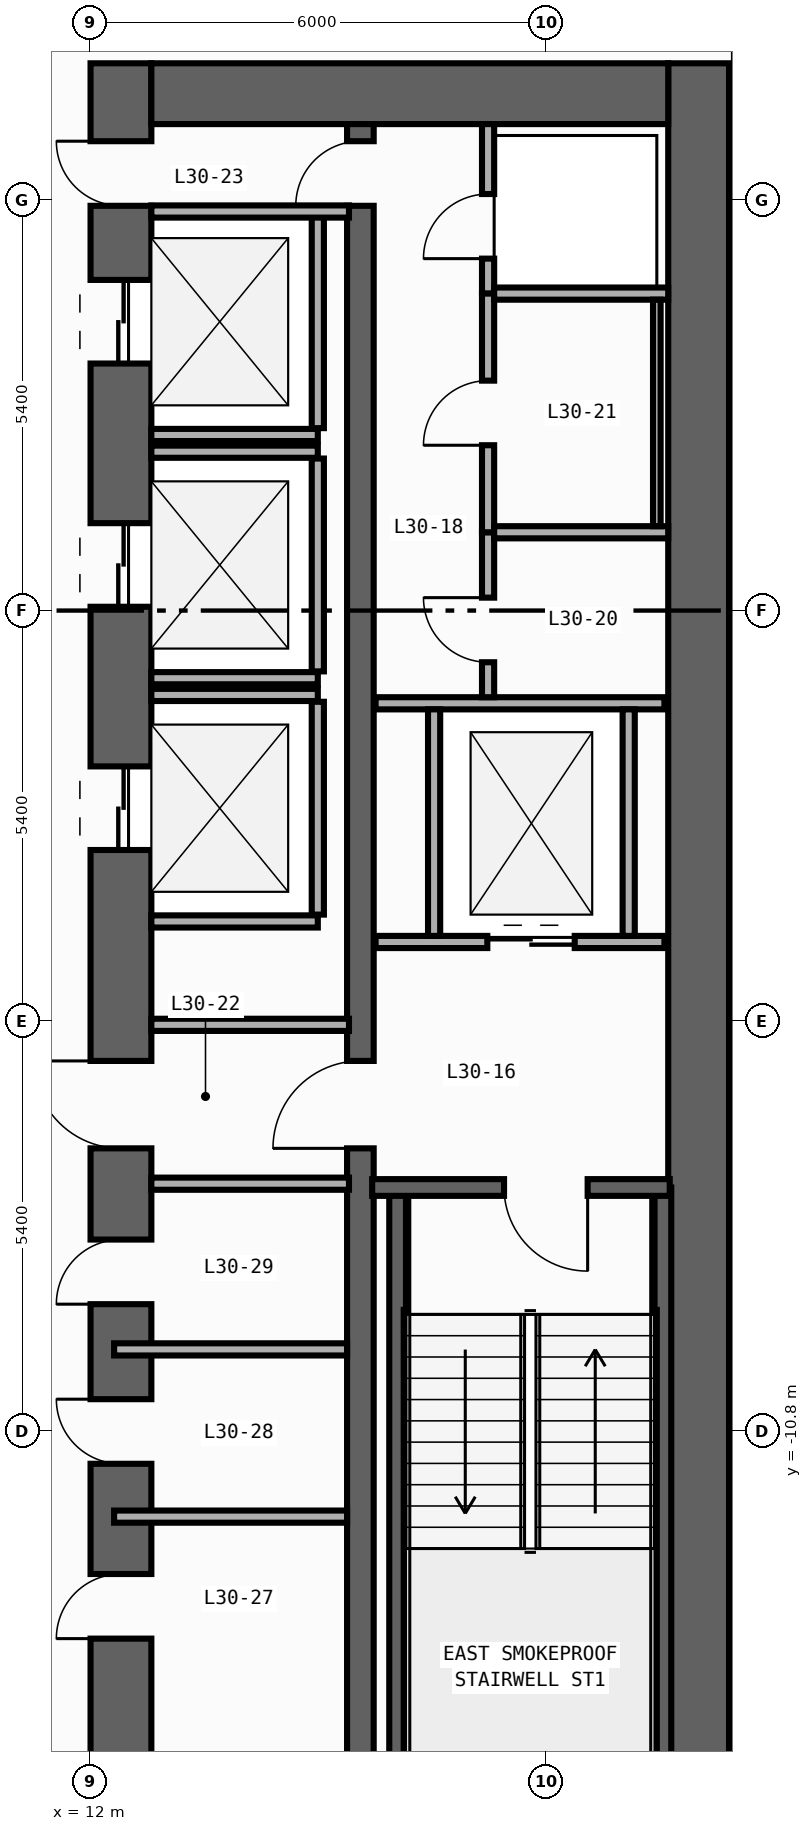
"""IFC4 building model, lengths in metres.
Left out: names, types, materials, properties, quantities, classifications, styles, units other than length and angle.
Written with IfcOpenShell. Run it as: python <this file> out.ifc"""

import sys

from ifc_helpers import new_model, si_unit, direction, frame, frame_2d, origin, place, context, subcontext, project, spatial, rectangle, extrude, element, fill, save


model = new_model("IFC4")
c1 = context("Model", 3, precision=1e-05, world=origin(), true_north=direction((0.0, 1.0)))
c2 = subcontext(c1, "Body", "Model", "MODEL_VIEW")
j1 = project(units=[si_unit("LENGTHUNIT", "METRE"), si_unit("PLANEANGLEUNIT", "RADIAN")], contexts=[c1])
p1 = place(None, origin())
s1 = spatial("IfcSite", under=j1, at=p1, CompositionType="ELEMENT")
p2 = place(p1, origin())
s2 = spatial("IfcBuilding", under=s1, at=p2, CompositionType="ELEMENT")
p3 = place(p2, frame((0.0, 0.0, 131.0)))
s3 = spatial("IfcBuildingStorey", under=s2, at=p3, CompositionType="ELEMENT", Elevation=131.0)
p4 = place(p3, frame((12.4, -19.8, 0.0), z_axis=(0.0, 0.0, 1.0), x_axis=(0.0, 1.0, 0.0)))
e1 = element("IfcWall", 1, at=p4, inside=s3, PredefinedType="SHEAR", context=c2, shape_type="SweptSolid", body=[
    extrude(rectangle(XDim=27.0, YDim=0.8, at=frame_2d((13.5, 0.0))), origin(), (0.0, 0.0, 1.0), 3.94),
])
p5 = place(p4, frame((23.05, 0.0, 0.0)))
e2 = element("IfcOpeningElement", 2, at=p5, cuts=e1, PredefinedType="OPENING", context=c2, shape_type="SweptSolid", body=[
    extrude(rectangle(XDim=1.1, YDim=2.2, at=frame_2d((0.55, 1.1))), frame((0.0, 0.41, 0.0), z_axis=(0.0, -1.0, 0.0), x_axis=(1.0, 0.0, 0.0)), (0.0, 0.0, 1.0), 0.82),
])
p6 = place(p4, frame((19.85, 0.0, 0.0)))
e3 = element("IfcOpeningElement", 3, at=p6, cuts=e1, PredefinedType="OPENING", context=c2, shape_type="SweptSolid", body=[
    extrude(rectangle(XDim=1.1, YDim=2.2, at=frame_2d((0.55, 1.1))), frame((0.0, 0.41, 0.0), z_axis=(0.0, -1.0, 0.0), x_axis=(1.0, 0.0, 0.0)), (0.0, 0.0, 1.0), 0.82),
])
p7 = place(p4, frame((16.65, 0.0, 0.0)))
e4 = element("IfcOpeningElement", 4, at=p7, cuts=e1, PredefinedType="OPENING", context=c2, shape_type="SweptSolid", body=[
    extrude(rectangle(XDim=1.1, YDim=2.2, at=frame_2d((0.55, 1.1))), frame((0.0, 0.41, 0.0), z_axis=(0.0, -1.0, 0.0), x_axis=(1.0, 0.0, 0.0)), (0.0, 0.0, 1.0), 0.82),
])
p8 = place(p4, frame((6.275, 0.0, 0.0)))
e5 = element("IfcOpeningElement", 5, at=p8, cuts=e1, PredefinedType="OPENING", context=c2, shape_type="SweptSolid", body=[
    extrude(rectangle(XDim=0.85, YDim=2.1, at=frame_2d((0.425, 1.05))), frame((0.0, 0.41, 0.0), z_axis=(0.0, -1.0, 0.0), x_axis=(1.0, 0.0, 0.0)), (0.0, 0.0, 1.0), 0.82),
])
p9 = place(p4, frame((8.575, 0.0, 0.0)))
e6 = element("IfcOpeningElement", 6, at=p9, cuts=e1, PredefinedType="OPENING", context=c2, shape_type="SweptSolid", body=[
    extrude(rectangle(XDim=0.85, YDim=2.1, at=frame_2d((0.425, 1.05))), frame((0.0, 0.41, 0.0), z_axis=(0.0, -1.0, 0.0), x_axis=(1.0, 0.0, 0.0)), (0.0, 0.0, 1.0), 0.82),
])
p10 = place(p4, frame((10.675, 0.0, 0.0)))
e7 = element("IfcOpeningElement", 7, at=p10, cuts=e1, PredefinedType="OPENING", context=c2, shape_type="SweptSolid", body=[
    extrude(rectangle(XDim=0.85, YDim=2.1, at=frame_2d((0.425, 1.05))), frame((0.0, 0.41, 0.0), z_axis=(0.0, -1.0, 0.0), x_axis=(1.0, 0.0, 0.0)), (0.0, 0.0, 1.0), 0.82),
])
p11 = place(p4, frame((12.725, 0.0, 0.0)))
e8 = element("IfcOpeningElement", 8, at=p11, cuts=e1, PredefinedType="OPENING", context=c2, shape_type="SweptSolid", body=[
    extrude(rectangle(XDim=1.15, YDim=2.2, at=frame_2d((0.575, 1.1))), frame((0.0, 0.41, 0.0), z_axis=(0.0, -1.0, 0.0), x_axis=(1.0, 0.0, 0.0)), (0.0, 0.0, 1.0), 0.82),
])
p12 = place(p4, frame((25.125, 0.0, 0.0)))
e9 = element("IfcOpeningElement", 9, at=p12, cuts=e1, PredefinedType="OPENING", context=c2, shape_type="SweptSolid", body=[
    extrude(rectangle(XDim=0.85, YDim=2.1, at=frame_2d((0.425, 1.05))), frame((0.0, 0.41, 0.0), z_axis=(0.0, -1.0, 0.0), x_axis=(1.0, 0.0, 0.0)), (0.0, 0.0, 1.0), 0.82),
])
p13 = place(p3, frame((20.0, -19.8, 0.0), z_axis=(0.0, 0.0, 1.0), x_axis=(0.0, 1.0, 0.0)))
e10 = element("IfcWall", 10, at=p13, inside=s3, PredefinedType="SHEAR", context=c2, shape_type="SweptSolid", body=[
    extrude(rectangle(XDim=27.0, YDim=0.8, at=frame_2d((13.5, 0.0))), origin(), (0.0, 0.0, 1.0), 3.94),
])
p14 = place(p3, frame((12.8, 6.8, 0.0), z_axis=(0.0, 0.0, 1.0), x_axis=(1.0, 0.0, 0.0)))
e11 = element("IfcWall", 11, at=p14, inside=s3, PredefinedType="SHEAR", context=c2, shape_type="SweptSolid", body=[
    extrude(rectangle(XDim=6.8, YDim=0.8, at=frame_2d((3.4, 0.0))), origin(), (0.0, 0.0, 1.0), 3.94),
])
p15 = place(p3, frame((15.55, -19.0, 0.0), z_axis=(0.0, 0.0, 1.0), x_axis=(0.0, 1.0, 0.0)))
e12 = element("IfcWall", 12, at=p15, inside=s3, PredefinedType="SHEAR", context=c2, shape_type="SweptSolid", body=[
    extrude(rectangle(XDim=25.4, YDim=0.35, at=frame_2d((12.7, 0.0))), origin(), (0.0, 0.0, 1.0), 3.94),
])
p16 = place(p15, frame((11.925, 0.0, 0.0)))
e13 = element("IfcOpeningElement", 13, at=p16, cuts=e12, PredefinedType="OPENING", context=c2, shape_type="SweptSolid", body=[
    extrude(rectangle(XDim=1.15, YDim=2.2, at=frame_2d((0.575, 1.1))), frame((0.0, 0.185, 0.0), z_axis=(0.0, -1.0, 0.0), x_axis=(1.0, 0.0, 0.0)), (0.0, 0.0, 1.0), 0.37),
])
p17 = place(p15, frame((24.325, 0.0, 0.0)))
e14 = element("IfcOpeningElement", 14, at=p17, cuts=e12, PredefinedType="OPENING", context=c2, shape_type="SweptSolid", body=[
    extrude(rectangle(XDim=0.85, YDim=2.1, at=frame_2d((0.425, 1.05))), frame((0.0, 0.185, 0.0), z_axis=(0.0, -1.0, 0.0), x_axis=(1.0, 0.0, 0.0)), (0.0, 0.0, 1.0), 0.37),
])
for number, where, z_axis, x_axis in (
    (15, (16.04, -18.89, 0.0), (0.0, 0.0, 1.0), (0.0, 1.0, 0.0)),
    (16, (19.53, -18.89, 0.0), (0.0, 0.0, 1.0), (0.0, 1.0, 0.0)),
):
    element("IfcWall", number, at=place(p3, frame(where, z_axis=z_axis, x_axis=x_axis)), inside=s3, PredefinedType="SHEAR", context=c2, shape_type="SweptSolid", body=[
        extrude(rectangle(XDim=11.3, YDim=0.22, at=frame_2d((5.65, 0.0))), origin(), (0.0, 0.0, 1.0), 3.94),
    ])
p18 = place(p3, frame((19.62, -7.59, 0.0), z_axis=(0.0, 0.0, 1.0), x_axis=(-1.0, 0.0, 0.0)))
e17 = element("IfcWall", 17, at=p18, inside=s3, PredefinedType="SHEAR", context=c2, shape_type="SweptSolid", body=[
    extrude(rectangle(XDim=3.915, YDim=0.22, at=frame_2d((1.958, 0.0))), origin(), (0.0, 0.0, 1.0), 3.94),
])
p19 = place(p18, frame((1.08, 0.0, 0.0)))
e18 = element("IfcOpeningElement", 18, at=p19, cuts=e17, PredefinedType="OPENING", context=c2, shape_type="SweptSolid", body=[
    extrude(rectangle(XDim=1.1, YDim=2.2, at=frame_2d((0.55, 1.1))), frame((0.0, 0.12, 0.0), z_axis=(0.0, -1.0, 0.0), x_axis=(1.0, 0.0, 0.0)), (0.0, 0.0, 1.0), 0.24),
])
p20 = place(p3, frame((12.8, 2.31, 0.0), z_axis=(0.0, 0.0, 1.0), x_axis=(1.0, 0.0, 0.0)))
e19 = element("IfcWall", 19, at=p20, inside=s3, PredefinedType="STANDARD", context=c2, shape_type="SweptSolid", body=[
    extrude(rectangle(XDim=2.19, YDim=0.16, at=frame_2d((1.095, 0.0))), origin(), (0.0, 0.0, 1.0), 3.94),
])
p21 = place(p3, frame((14.99, 2.4, 0.0), z_axis=(0.0, 0.0, 1.0), x_axis=(0.0, 1.0, 0.0)))
e20 = element("IfcWall", 20, at=p21, inside=s3, PredefinedType="STANDARD", context=c2, shape_type="SweptSolid", body=[
    extrude(rectangle(XDim=2.8, YDim=0.16, at=frame_2d((1.4, 0.0))), origin(), (0.0, 0.0, 1.0), 3.94),
])
for number, where, z_axis, x_axis in (
    (21, (12.8, -0.89, 0.0), (0.0, 0.0, 1.0), (1.0, 0.0, 0.0)),
    (22, (12.8, 2.09, 0.0), (0.0, 0.0, 1.0), (1.0, 0.0, 0.0)),
):
    element("IfcWall", number, at=place(p3, frame(where, z_axis=z_axis, x_axis=x_axis)), inside=s3, PredefinedType="STANDARD", context=c2, shape_type="SweptSolid", body=[
        extrude(rectangle(XDim=2.19, YDim=0.16, at=frame_2d((1.095, 0.0))), origin(), (0.0, 0.0, 1.0), 3.94),
    ])
p22 = place(p3, frame((14.99, -0.8, 0.0), z_axis=(0.0, 0.0, 1.0), x_axis=(0.0, 1.0, 0.0)))
e23 = element("IfcWall", 23, at=p22, inside=s3, PredefinedType="STANDARD", context=c2, shape_type="SweptSolid", body=[
    extrude(rectangle(XDim=2.8, YDim=0.16, at=frame_2d((1.4, 0.0))), origin(), (0.0, 0.0, 1.0), 3.94),
])
for number, where, z_axis, x_axis in (
    (24, (12.8, -4.09, 0.0), (0.0, 0.0, 1.0), (1.0, 0.0, 0.0)),
    (25, (12.8, -1.11, 0.0), (0.0, 0.0, 1.0), (1.0, 0.0, 0.0)),
):
    element("IfcWall", number, at=place(p3, frame(where, z_axis=z_axis, x_axis=x_axis)), inside=s3, PredefinedType="STANDARD", context=c2, shape_type="SweptSolid", body=[
        extrude(rectangle(XDim=2.19, YDim=0.16, at=frame_2d((1.095, 0.0))), origin(), (0.0, 0.0, 1.0), 3.94),
    ])
p23 = place(p3, frame((14.99, -4.0, 0.0), z_axis=(0.0, 0.0, 1.0), x_axis=(0.0, 1.0, 0.0)))
e26 = element("IfcWall", 26, at=p23, inside=s3, PredefinedType="STANDARD", context=c2, shape_type="SweptSolid", body=[
    extrude(rectangle(XDim=2.8, YDim=0.16, at=frame_2d((1.4, 0.0))), origin(), (0.0, 0.0, 1.0), 3.94),
])
p24 = place(p3, frame((15.75, -4.36, 0.0), z_axis=(0.0, 0.0, 1.0), x_axis=(1.0, 0.0, 0.0)))
e27 = element("IfcWall", 27, at=p24, inside=s3, PredefinedType="STANDARD", context=c2, shape_type="SweptSolid", body=[
    extrude(rectangle(XDim=3.8, YDim=0.16, at=frame_2d((1.9, 0.0))), origin(), (0.0, 0.0, 1.0), 3.94),
])
p25 = place(p24, frame((1.47, 0.0, 0.0)))
e28 = element("IfcOpeningElement", 28, at=p25, cuts=e27, PredefinedType="OPENING", context=c2, shape_type="SweptSolid", body=[
    extrude(rectangle(XDim=1.15, YDim=2.2, at=frame_2d((0.575, 1.1))), frame((0.0, 0.09, 0.0), z_axis=(0.0, -1.0, 0.0), x_axis=(1.0, 0.0, 0.0)), (0.0, 0.0, 1.0), 0.18),
])
p26 = place(p3, frame((15.75, -1.22, 0.0), z_axis=(0.0, 0.0, 1.0), x_axis=(1.0, 0.0, 0.0)))
e29 = element("IfcWall", 29, at=p26, inside=s3, PredefinedType="STANDARD", context=c2, shape_type="SweptSolid", body=[
    extrude(rectangle(XDim=3.8, YDim=0.16, at=frame_2d((1.9, 0.0))), origin(), (0.0, 0.0, 1.0), 3.94),
])
for number, where, z_axis, x_axis in (
    (30, (16.52, -4.28, 0.0), (0.0, 0.0, 1.0), (0.0, 1.0, 0.0)),
    (31, (19.08, -4.28, 0.0), (0.0, 0.0, 1.0), (0.0, 1.0, 0.0)),
):
    element("IfcWall", number, at=place(p3, frame(where, z_axis=z_axis, x_axis=x_axis)), inside=s3, PredefinedType="STANDARD", context=c2, shape_type="SweptSolid", body=[
        extrude(rectangle(XDim=2.98, YDim=0.16, at=frame_2d((1.49, 0.0))), origin(), (0.0, 0.0, 1.0), 3.94),
    ])
for number, where, z_axis, x_axis in (
    (32, (12.8, -5.45, 0.0), (0.0, 0.0, 1.0), (1.0, 0.0, 0.0)),
    (33, (12.8, -7.54, 0.0), (0.0, 0.0, 1.0), (1.0, 0.0, 0.0)),
    (34, (12.8, 5.25, 0.0), (0.0, 0.0, 1.0), (1.0, 0.0, 0.0)),
):
    element("IfcWall", number, at=place(p3, frame(where, z_axis=z_axis, x_axis=x_axis)), inside=s3, PredefinedType="STANDARD", context=c2, shape_type="SweptSolid", body=[
        extrude(rectangle(XDim=2.6, YDim=0.16, at=frame_2d((1.3, 0.0))), origin(), (0.0, 0.0, 1.0), 3.94),
    ])
p27 = place(p3, frame((17.23, 4.17, 0.0), z_axis=(0.0, 0.0, 1.0), x_axis=(0.0, 1.0, 0.0)))
e35 = element("IfcWall", 35, at=p27, inside=s3, PredefinedType="PARTITIONING", context=c2, shape_type="SweptSolid", body=[
    extrude(rectangle(XDim=2.23, YDim=0.16, at=frame_2d((1.115, 0.0))), origin(), (0.0, 0.0, 1.0), 3.94),
])
p28 = place(p27, frame((0.46, 0.0, 0.0)))
e36 = element("IfcOpeningElement", 36, at=p28, cuts=e35, PredefinedType="OPENING", context=c2, shape_type="SweptSolid", body=[
    extrude(rectangle(XDim=0.85, YDim=2.1, at=frame_2d((0.425, 1.05))), frame((0.0, 0.09, 0.0), z_axis=(0.0, -1.0, 0.0), x_axis=(1.0, 0.0, 0.0)), (0.0, 0.0, 1.0), 0.18),
])
p29 = place(p3, frame((17.23, -1.14, 0.0), z_axis=(0.0, 0.0, 1.0), x_axis=(0.0, 1.0, 0.0)))
e37 = element("IfcWall", 37, at=p29, inside=s3, PredefinedType="PARTITIONING", context=c2, shape_type="SweptSolid", body=[
    extrude(rectangle(XDim=2.17, YDim=0.16, at=frame_2d((1.085, 0.0))), origin(), (0.0, 0.0, 1.0), 3.94),
])
p30 = place(p29, frame((0.46, 0.0, 0.0)))
e38 = element("IfcOpeningElement", 38, at=p30, cuts=e37, PredefinedType="OPENING", context=c2, shape_type="SweptSolid", body=[
    extrude(rectangle(XDim=0.85, YDim=2.1, at=frame_2d((0.425, 1.05))), frame((0.0, 0.09, 0.0), z_axis=(0.0, -1.0, 0.0), x_axis=(1.0, 0.0, 0.0)), (0.0, 0.0, 1.0), 0.18),
])
p31 = place(p3, frame((17.23, 1.03, 0.0), z_axis=(0.0, 0.0, 1.0), x_axis=(0.0, 1.0, 0.0)))
e39 = element("IfcWall", 39, at=p31, inside=s3, PredefinedType="PARTITIONING", context=c2, shape_type="SweptSolid", body=[
    extrude(rectangle(XDim=3.14, YDim=0.16, at=frame_2d((1.57, 0.0))), origin(), (0.0, 0.0, 1.0), 3.94),
])
p32 = place(p31, frame((1.145, 0.0, 0.0)))
e40 = element("IfcOpeningElement", 40, at=p32, cuts=e39, PredefinedType="OPENING", context=c2, shape_type="SweptSolid", body=[
    extrude(rectangle(XDim=0.85, YDim=2.1, at=frame_2d((0.425, 1.05))), frame((0.0, 0.09, 0.0), z_axis=(0.0, -1.0, 0.0), x_axis=(1.0, 0.0, 0.0)), (0.0, 0.0, 1.0), 0.18),
])
for number, where, z_axis, x_axis in (
    (41, (17.31, 4.17, 0.0), (0.0, 0.0, 1.0), (1.0, 0.0, 0.0)),
    (42, (17.31, 1.03, 0.0), (0.0, 0.0, 1.0), (1.0, 0.0, 0.0)),
):
    element("IfcWall", number, at=place(p3, frame(where, z_axis=z_axis, x_axis=x_axis)), inside=s3, PredefinedType="PARTITIONING", context=c2, shape_type="SweptSolid", body=[
        extrude(rectangle(XDim=2.29, YDim=0.16, at=frame_2d((1.145, 0.0))), origin(), (0.0, 0.0, 1.0), 3.94),
    ])
for number, where, z_axis, x_axis in (
    (43, (12.31, -11.92, 0.0), (0.0, 0.0, 1.0), (1.0, 0.0, 0.0)),
    (44, (12.31, -9.72, 0.0), (0.0, 0.0, 1.0), (1.0, 0.0, 0.0)),
):
    element("IfcWall", number, at=place(p3, frame(where, z_axis=z_axis, x_axis=x_axis)), inside=s3, PredefinedType="PARTITIONING", context=c2, shape_type="SweptSolid", body=[
        extrude(rectangle(XDim=3.065, YDim=0.16, at=frame_2d((1.532, 0.0))), origin(), (0.0, 0.0, 1.0), 3.94),
    ])
p33 = place(p3, frame((19.45, 4.09, 0.0), z_axis=(0.0, 0.0, 1.0), x_axis=(0.0, -1.0, 0.0)))
e45 = element("IfcWall", 45, at=p33, inside=s3, PredefinedType="PARTITIONING", context=c2, shape_type="SweptSolid", body=[
    extrude(rectangle(XDim=2.98, YDim=0.1, at=frame_2d((1.49, 0.0))), origin(), (0.0, 0.0, 1.0), 3.94),
])
p34 = place(p19, origin())
e46 = element("IfcDoor", 46, at=p34, inside=s3, OperationType="SINGLE_SWING_LEFT", PredefinedType="DOOR", context=c2, shape_type="SweptSolid", body=[
    extrude(rectangle(XDim=1.1, YDim=2.2, at=frame_2d((0.55, 1.1))), frame((0.0, 0.025, 0.0), z_axis=(0.0, -1.0, 0.0), x_axis=(1.0, 0.0, 0.0)), (0.0, 0.0, 1.0), 0.05),
])
fill(e18, e46)
p35 = place(p5, origin())
e47 = element("IfcDoor", 47, at=p35, inside=s3, OperationType="DOUBLE_DOOR_SLIDING", PredefinedType="DOOR", context=c2, shape_type="SweptSolid", body=[
    extrude(rectangle(XDim=1.1, YDim=2.2, at=frame_2d((0.55, 1.1))), frame((0.0, 0.025, 0.0), z_axis=(0.0, -1.0, 0.0), x_axis=(1.0, 0.0, 0.0)), (0.0, 0.0, 1.0), 0.05),
])
fill(e2, e47)
p36 = place(p6, origin())
e48 = element("IfcDoor", 48, at=p36, inside=s3, OperationType="DOUBLE_DOOR_SLIDING", PredefinedType="DOOR", context=c2, shape_type="SweptSolid", body=[
    extrude(rectangle(XDim=1.1, YDim=2.2, at=frame_2d((0.55, 1.1))), frame((0.0, 0.025, 0.0), z_axis=(0.0, -1.0, 0.0), x_axis=(1.0, 0.0, 0.0)), (0.0, 0.0, 1.0), 0.05),
])
fill(e3, e48)
p37 = place(p7, origin())
e49 = element("IfcDoor", 49, at=p37, inside=s3, OperationType="DOUBLE_DOOR_SLIDING", PredefinedType="DOOR", context=c2, shape_type="SweptSolid", body=[
    extrude(rectangle(XDim=1.1, YDim=2.2, at=frame_2d((0.55, 1.1))), frame((0.0, 0.025, 0.0), z_axis=(0.0, -1.0, 0.0), x_axis=(1.0, 0.0, 0.0)), (0.0, 0.0, 1.0), 0.05),
])
fill(e4, e49)
p38 = place(p8, origin())
e50 = element("IfcDoor", 50, at=p38, inside=s3, OperationType="SINGLE_SWING_LEFT", PredefinedType="DOOR", context=c2, shape_type="SweptSolid", body=[
    extrude(rectangle(XDim=0.85, YDim=2.1, at=frame_2d((0.425, 1.05))), frame((0.0, 0.025, 0.0), z_axis=(0.0, -1.0, 0.0), x_axis=(1.0, 0.0, 0.0)), (0.0, 0.0, 1.0), 0.05),
])
fill(e5, e50)
p39 = place(p9, origin())
e51 = element("IfcDoor", 51, at=p39, inside=s3, OperationType="SINGLE_SWING_RIGHT", PredefinedType="DOOR", context=c2, shape_type="SweptSolid", body=[
    extrude(rectangle(XDim=0.85, YDim=2.1, at=frame_2d((0.425, 1.05))), frame((0.0, 0.025, 0.0), z_axis=(0.0, -1.0, 0.0), x_axis=(1.0, 0.0, 0.0)), (0.0, 0.0, 1.0), 0.05),
])
fill(e6, e51)
p40 = place(p10, origin())
e52 = element("IfcDoor", 52, at=p40, inside=s3, OperationType="SINGLE_SWING_LEFT", PredefinedType="DOOR", context=c2, shape_type="SweptSolid", body=[
    extrude(rectangle(XDim=0.85, YDim=2.1, at=frame_2d((0.425, 1.05))), frame((0.0, 0.025, 0.0), z_axis=(0.0, -1.0, 0.0), x_axis=(1.0, 0.0, 0.0)), (0.0, 0.0, 1.0), 0.05),
])
fill(e7, e52)
p41 = place(p11, origin())
e53 = element("IfcDoor", 53, at=p41, inside=s3, OperationType="SINGLE_SWING_RIGHT", PredefinedType="DOOR", context=c2, shape_type="SweptSolid", body=[
    extrude(rectangle(XDim=1.15, YDim=2.2, at=frame_2d((0.575, 1.1))), frame((0.0, 0.025, 0.0), z_axis=(0.0, -1.0, 0.0), x_axis=(1.0, 0.0, 0.0)), (0.0, 0.0, 1.0), 0.05),
])
fill(e8, e53)
p42 = place(p16, origin())
e54 = element("IfcDoor", 54, at=p42, inside=s3, OperationType="SINGLE_SWING_LEFT", PredefinedType="DOOR", context=c2, shape_type="SweptSolid", body=[
    extrude(rectangle(XDim=1.15, YDim=2.2, at=frame_2d((0.575, 1.1))), frame((0.0, 0.025, 0.0), z_axis=(0.0, -1.0, 0.0), x_axis=(1.0, 0.0, 0.0)), (0.0, 0.0, 1.0), 0.05),
])
fill(e13, e54)
p43 = place(p12, origin())
e55 = element("IfcDoor", 55, at=p43, inside=s3, OperationType="SINGLE_SWING_RIGHT", PredefinedType="DOOR", context=c2, shape_type="SweptSolid", body=[
    extrude(rectangle(XDim=0.85, YDim=2.1, at=frame_2d((0.425, 1.05))), frame((0.0, 0.025, 0.0), z_axis=(0.0, -1.0, 0.0), x_axis=(1.0, 0.0, 0.0)), (0.0, 0.0, 1.0), 0.05),
])
fill(e9, e55)
p44 = place(p17, origin())
e56 = element("IfcDoor", 56, at=p44, inside=s3, OperationType="SINGLE_SWING_LEFT", PredefinedType="DOOR", context=c2, shape_type="SweptSolid", body=[
    extrude(rectangle(XDim=0.85, YDim=2.1, at=frame_2d((0.425, 1.05))), frame((0.0, 0.025, 0.0), z_axis=(0.0, -1.0, 0.0), x_axis=(1.0, 0.0, 0.0)), (0.0, 0.0, 1.0), 0.05),
])
fill(e14, e56)
p45 = place(p25, origin())
e57 = element("IfcDoor", 57, at=p45, inside=s3, OperationType="DOUBLE_DOOR_SLIDING", PredefinedType="DOOR", context=c2, shape_type="SweptSolid", body=[
    extrude(rectangle(XDim=1.15, YDim=2.2, at=frame_2d((0.575, 1.1))), frame((0.0, 0.025, 0.0), z_axis=(0.0, -1.0, 0.0), x_axis=(1.0, 0.0, 0.0)), (0.0, 0.0, 1.0), 0.05),
])
fill(e28, e57)
p46 = place(p28, origin())
e58 = element("IfcDoor", 58, at=p46, inside=s3, OperationType="SINGLE_SWING_LEFT", PredefinedType="DOOR", context=c2, shape_type="SweptSolid", body=[
    extrude(rectangle(XDim=0.85, YDim=2.1, at=frame_2d((0.425, 1.05))), frame((0.0, 0.025, 0.0), z_axis=(0.0, -1.0, 0.0), x_axis=(1.0, 0.0, 0.0)), (0.0, 0.0, 1.0), 0.05),
])
fill(e36, e58)
p47 = place(p30, origin())
e59 = element("IfcDoor", 59, at=p47, inside=s3, OperationType="SINGLE_SWING_RIGHT", PredefinedType="DOOR", context=c2, shape_type="SweptSolid", body=[
    extrude(rectangle(XDim=0.85, YDim=2.1, at=frame_2d((0.425, 1.05))), frame((0.0, 0.025, 0.0), z_axis=(0.0, -1.0, 0.0), x_axis=(1.0, 0.0, 0.0)), (0.0, 0.0, 1.0), 0.05),
])
fill(e38, e59)
p48 = place(p32, origin())
e60 = element("IfcDoor", 60, at=p48, inside=s3, OperationType="SINGLE_SWING_LEFT", PredefinedType="DOOR", context=c2, shape_type="SweptSolid", body=[
    extrude(rectangle(XDim=0.85, YDim=2.1, at=frame_2d((0.425, 1.05))), frame((0.0, 0.025, 0.0), z_axis=(0.0, -1.0, 0.0), x_axis=(1.0, 0.0, 0.0)), (0.0, 0.0, 1.0), 0.05),
])
fill(e40, e60)
save(model, sys.argv[1])
